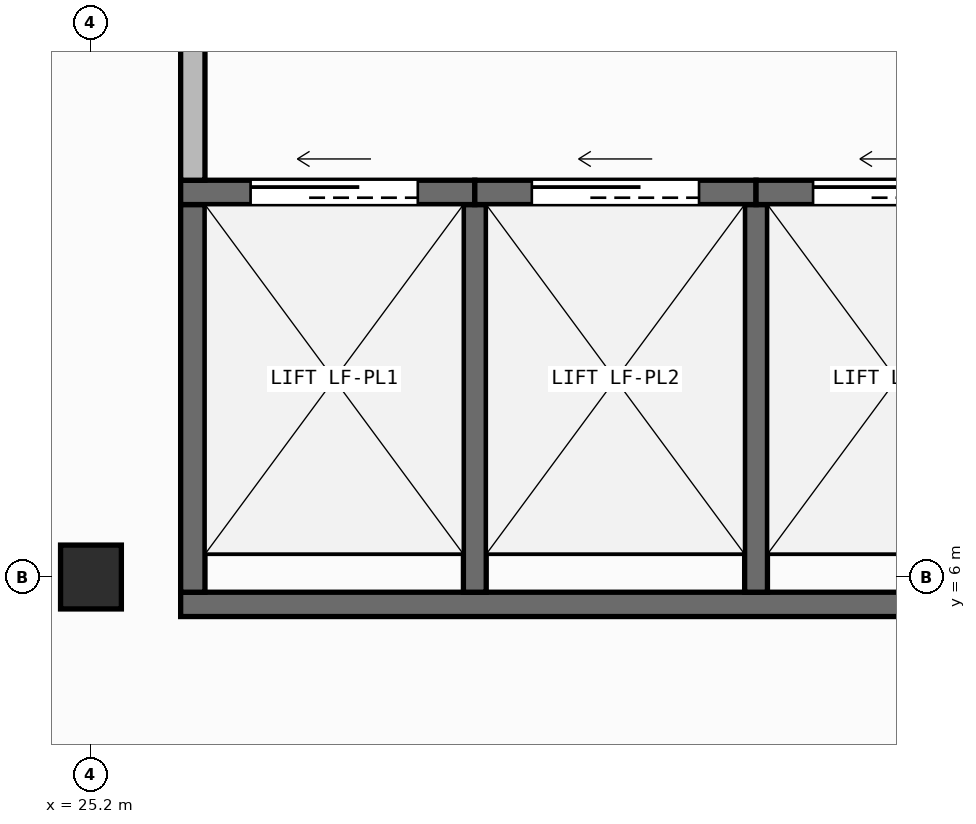
"""IFC4 building model, lengths in metres.
Left out: names, types, materials, properties, quantities, classifications, styles, units other than length and angle.
Written with IfcOpenShell. Run it as: python <this file> out.ifc"""

import sys

from ifc_helpers import new_model, si_unit, direction, frame, frame_2d, origin, origin_2d, place, context, subcontext, project, spatial, rectangle, i_section, extrude, element, fill, save


model = new_model("IFC4")
c1 = context("Model", 3, precision=1e-05, world=origin(), true_north=direction((0.0, 1.0)))
c2 = subcontext(c1, "Body", "Model", "MODEL_VIEW")
j1 = project(units=[si_unit("LENGTHUNIT", "METRE"), si_unit("PLANEANGLEUNIT", "RADIAN")], contexts=[c1])
p1 = place(None, origin())
s1 = spatial("IfcSite", under=j1, at=p1, CompositionType="ELEMENT")
p2 = place(p1, origin())
s2 = spatial("IfcBuilding", under=s1, at=p2, CompositionType="ELEMENT")
p3 = place(p2, frame((0.0, 0.0, -9.0)))
s3 = spatial("IfcBuildingStorey", under=s2, at=p3, CompositionType="ELEMENT", Elevation=-9.0)
p4 = place(p3, frame((25.2, 6.0, 0.0), z_axis=(0.0, 0.0, 1.0), x_axis=(1.0, 0.0, 0.0)))
e1 = element("IfcColumn", 1, at=p4, inside=s3, PredefinedType="COLUMN", context=c2, shape_type="SweptSolid", body=[
    extrude(i_section(OverallWidth=0.4, OverallDepth=0.42, WebThickness=0.025, FlangeThickness=0.04, at=origin_2d()), origin(), (0.0, 0.0, 1.0), 4.5),
])
p5 = place(p3, frame((25.79, 5.82, 0.0), z_axis=(0.0, 0.0, 1.0), x_axis=(1.0, 0.0, 0.0)))
e2 = element("IfcWall", 2, at=p5, inside=s3, PredefinedType="SHEAR", context=c2, shape_type="SweptSolid", body=[
    extrude(rectangle(XDim=5.72, YDim=0.16, at=frame_2d((2.86, 0.0))), origin(), (0.0, 0.0, 1.0), 4.24),
])
p6 = place(p3, frame((25.87, 5.9, 0.0), z_axis=(0.0, 0.0, 1.0), x_axis=(0.0, 1.0, 0.0)))
e3 = element("IfcWall", 3, at=p6, inside=s3, PredefinedType="SHEAR", context=c2, shape_type="SweptSolid", body=[
    extrude(rectangle(XDim=2.55, YDim=0.16, at=frame_2d((1.275, 0.0))), origin(), (0.0, 0.0, 1.0), 4.24),
])
for number, where, z_axis, x_axis in (
    (4, (27.725, 5.9, 0.0), (0.0, 0.0, 1.0), (0.0, 1.0, 0.0)),
    (5, (29.575, 5.9, 0.0), (0.0, 0.0, 1.0), (0.0, 1.0, 0.0)),
):
    element("IfcWall", number, at=place(p3, frame(where, z_axis=z_axis, x_axis=x_axis)), inside=s3, PredefinedType="SHEAR", context=c2, shape_type="SweptSolid", body=[
        extrude(rectangle(XDim=2.55, YDim=0.15, at=frame_2d((1.275, 0.0))), origin(), (0.0, 0.0, 1.0), 4.24),
    ])
p7 = place(p3, frame((25.79, 8.53, 0.0), z_axis=(0.0, 0.0, 1.0), x_axis=(1.0, 0.0, 0.0)))
e6 = element("IfcWall", 6, at=p7, inside=s3, PredefinedType="SHEAR", context=c2, shape_type="SweptSolid", body=[
    extrude(rectangle(XDim=1.935, YDim=0.16, at=frame_2d((0.968, 0.0))), origin(), (0.0, 0.0, 1.0), 4.24),
])
p8 = place(p7, frame((0.46, 0.0, 0.0)))
e7 = element("IfcOpeningElement", 7, at=p8, cuts=e6, PredefinedType="OPENING", context=c2, shape_type="SweptSolid", body=[
    extrude(rectangle(XDim=1.1, YDim=2.15, at=frame_2d((0.55, 1.075))), frame((0.0, 0.09, 0.0), z_axis=(0.0, -1.0, 0.0), x_axis=(1.0, 0.0, 0.0)), (0.0, 0.0, 1.0), 0.18),
])
p9 = place(p3, frame((27.725, 8.53, 0.0), z_axis=(0.0, 0.0, 1.0), x_axis=(1.0, 0.0, 0.0)))
e8 = element("IfcWall", 8, at=p9, inside=s3, PredefinedType="SHEAR", context=c2, shape_type="SweptSolid", body=[
    extrude(rectangle(XDim=1.85, YDim=0.16, at=frame_2d((0.925, 0.0))), origin(), (0.0, 0.0, 1.0), 4.24),
])
p10 = place(p9, frame((0.375, 0.0, 0.0)))
e9 = element("IfcOpeningElement", 9, at=p10, cuts=e8, PredefinedType="OPENING", context=c2, shape_type="SweptSolid", body=[
    extrude(rectangle(XDim=1.1, YDim=2.15, at=frame_2d((0.55, 1.075))), frame((0.0, 0.09, 0.0), z_axis=(0.0, -1.0, 0.0), x_axis=(1.0, 0.0, 0.0)), (0.0, 0.0, 1.0), 0.18),
])
p11 = place(p3, frame((29.575, 8.53, 0.0), z_axis=(0.0, 0.0, 1.0), x_axis=(1.0, 0.0, 0.0)))
e10 = element("IfcWall", 10, at=p11, inside=s3, PredefinedType="SHEAR", context=c2, shape_type="SweptSolid", body=[
    extrude(rectangle(XDim=1.935, YDim=0.16, at=frame_2d((0.968, 0.0))), origin(), (0.0, 0.0, 1.0), 4.24),
])
p12 = place(p11, frame((0.375, 0.0, 0.0)))
e11 = element("IfcOpeningElement", 11, at=p12, cuts=e10, PredefinedType="OPENING", context=c2, shape_type="SweptSolid", body=[
    extrude(rectangle(XDim=1.1, YDim=2.15, at=frame_2d((0.55, 1.075))), frame((0.0, 0.09, 0.0), z_axis=(0.0, -1.0, 0.0), x_axis=(1.0, 0.0, 0.0)), (0.0, 0.0, 1.0), 0.18),
])
p13 = place(p3, frame((25.87, 8.61, 0.0), z_axis=(0.0, 0.0, 1.0), x_axis=(0.0, 1.0, 0.0)))
e12 = element("IfcWall", 12, at=p13, inside=s3, PredefinedType="PARTITIONING", context=c2, shape_type="SweptSolid", body=[
    extrude(rectangle(XDim=3.39, YDim=0.16, at=frame_2d((1.695, 0.0))), origin(), (0.0, 0.0, 1.0), 4.24),
])
p14 = place(p8, origin())
e13 = element("IfcDoor", 13, at=p14, inside=s3, OperationType="SLIDING_TO_LEFT", PredefinedType="DOOR", context=c2, shape_type="SweptSolid", body=[
    extrude(rectangle(XDim=1.1, YDim=2.15, at=frame_2d((0.55, 1.075))), frame((0.0, 0.025, 0.0), z_axis=(0.0, -1.0, 0.0), x_axis=(1.0, 0.0, 0.0)), (0.0, 0.0, 1.0), 0.05),
])
fill(e7, e13)
p15 = place(p10, origin())
e14 = element("IfcDoor", 14, at=p15, inside=s3, OperationType="SLIDING_TO_LEFT", PredefinedType="DOOR", context=c2, shape_type="SweptSolid", body=[
    extrude(rectangle(XDim=1.1, YDim=2.15, at=frame_2d((0.55, 1.075))), frame((0.0, 0.025, 0.0), z_axis=(0.0, -1.0, 0.0), x_axis=(1.0, 0.0, 0.0)), (0.0, 0.0, 1.0), 0.05),
])
fill(e9, e14)
p16 = place(p12, origin())
e15 = element("IfcDoor", 15, at=p16, inside=s3, OperationType="SLIDING_TO_LEFT", PredefinedType="DOOR", context=c2, shape_type="SweptSolid", body=[
    extrude(rectangle(XDim=1.1, YDim=2.15, at=frame_2d((0.55, 1.075))), frame((0.0, 0.025, 0.0), z_axis=(0.0, -1.0, 0.0), x_axis=(1.0, 0.0, 0.0)), (0.0, 0.0, 1.0), 0.05),
])
fill(e11, e15)
save(model, sys.argv[1])
